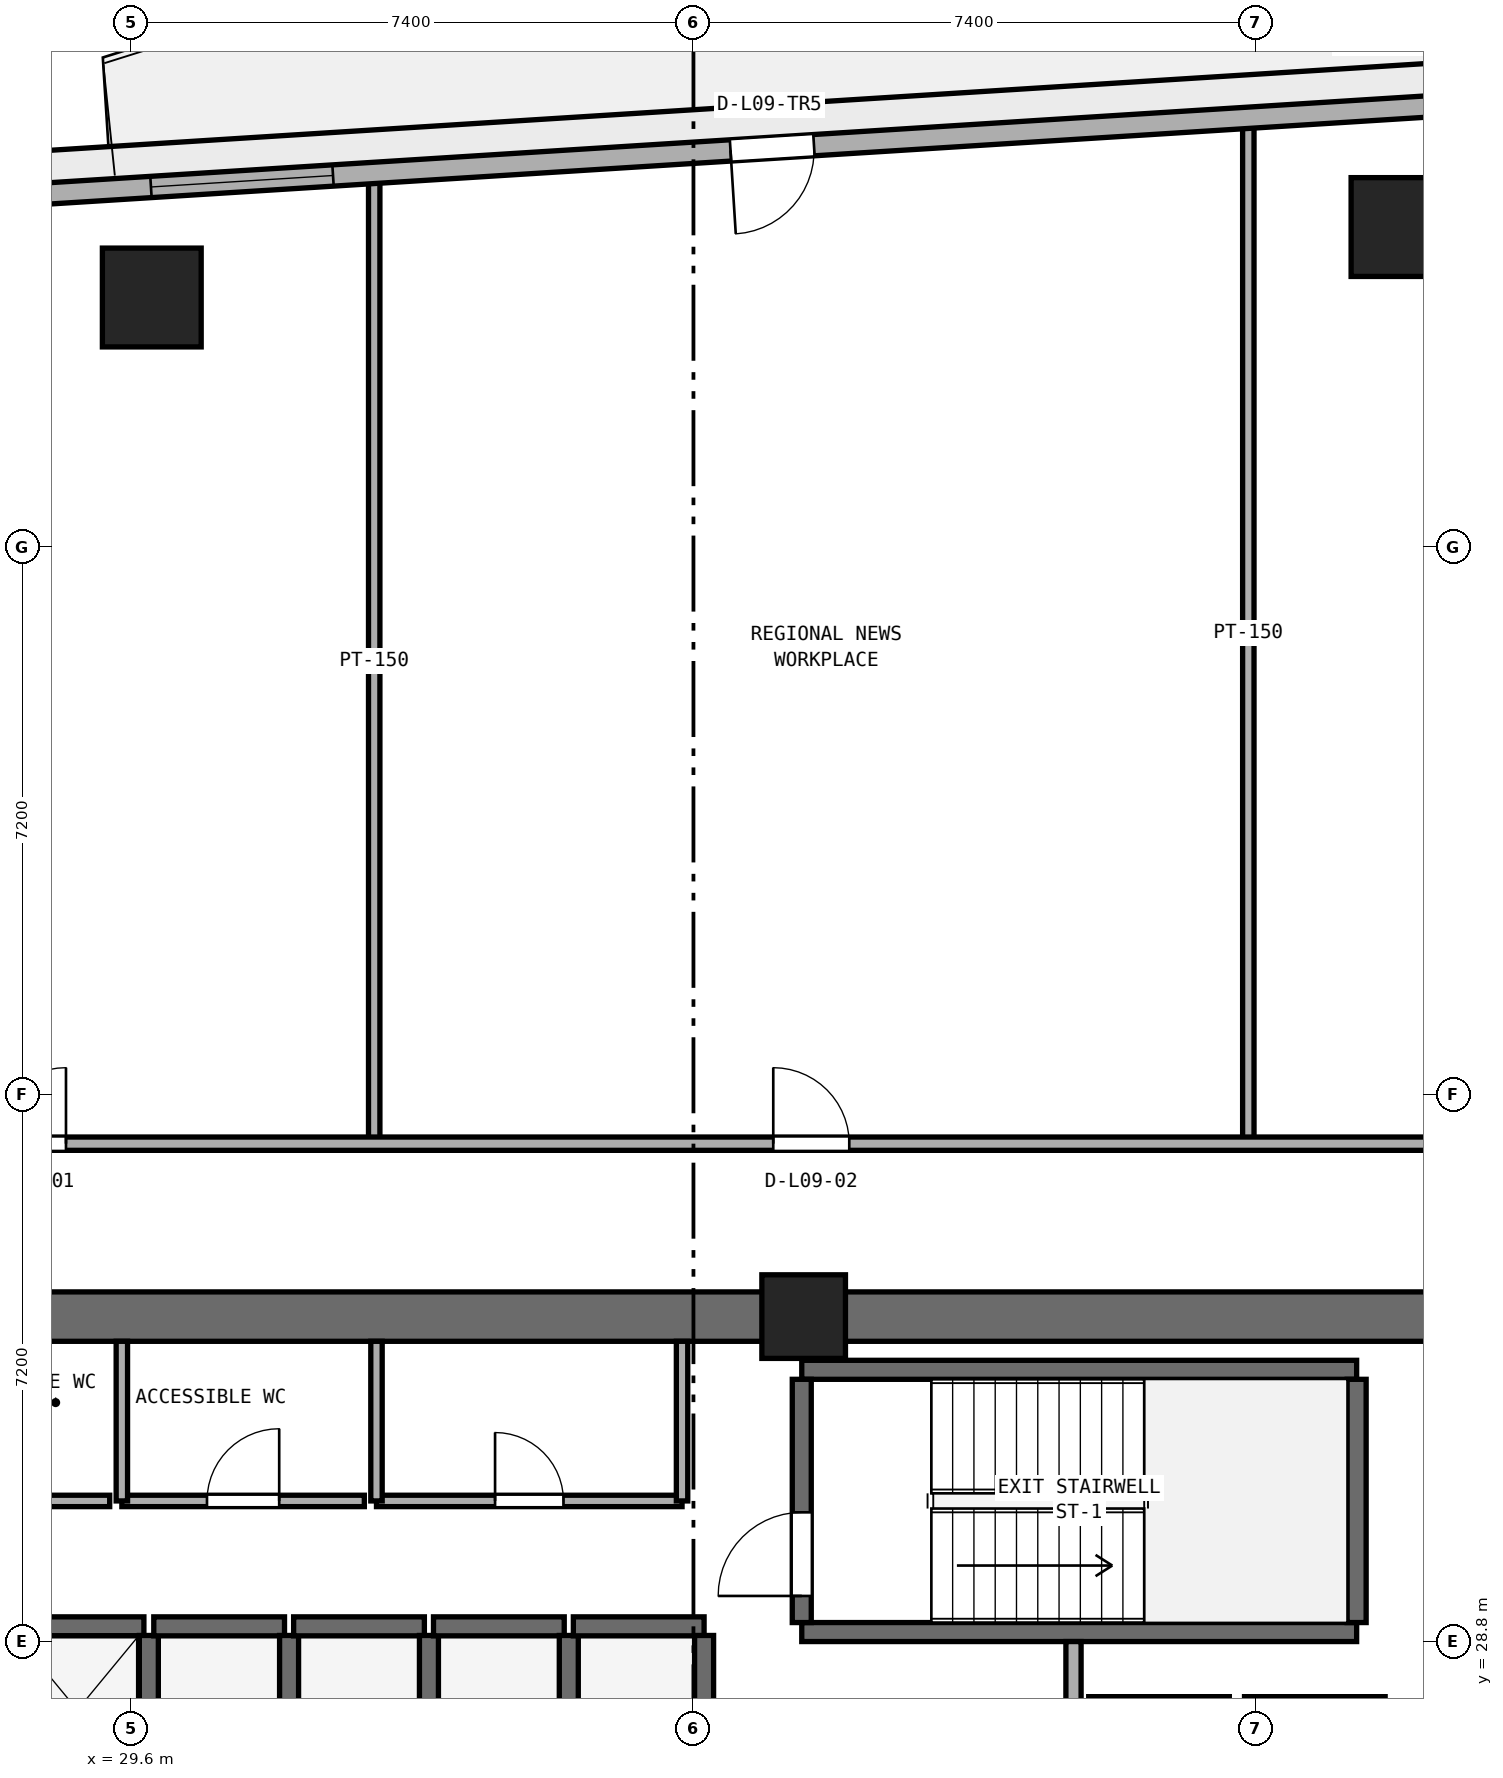
"""IFC4 building model, lengths in metres.
Left out: names, types, materials, properties, quantities, classifications, styles, units other than length and angle.
Written with IfcOpenShell. Run it as: python <this file> out.ifc"""

import sys

from ifc_helpers import new_model, si_unit, direction, frame, frame_2d, origin, origin_2d, place, context, subcontext, project, spatial, rectangle, extrude, element, fill, save


model = new_model("IFC4")
c1 = context("Model", 3, precision=1e-05, world=origin(), true_north=direction((0.0, 1.0)))
c2 = subcontext(c1, "Body", "Model", "MODEL_VIEW")
j1 = project(units=[si_unit("LENGTHUNIT", "METRE"), si_unit("PLANEANGLEUNIT", "RADIAN")], contexts=[c1])
p1 = place(None, origin())
s1 = spatial("IfcSite", under=j1, at=p1, CompositionType="ELEMENT")
p2 = place(p1, origin())
s2 = spatial("IfcBuilding", under=s1, at=p2, CompositionType="ELEMENT")
p3 = place(p2, frame((0.0, 0.0, 40.2)))
s3 = spatial("IfcBuildingStorey", under=s2, at=p3, CompositionType="ELEMENT", Elevation=40.2)
p4 = place(p3, frame((25.4, 33.075, 0.0), z_axis=(0.0, 0.0, 1.0), x_axis=(1.0, 0.0, 0.0)))
e1 = element("IfcWall", 1, at=p4, inside=s3, PredefinedType="SHEAR", context=c2, shape_type="SweptSolid", body=[
    extrude(rectangle(XDim=23.2, YDim=0.65, at=frame_2d((11.6, 0.0))), origin(), (0.0, 0.0, 1.0), 3.525),
])
p5 = place(p3, frame((38.45, 33.075, 0.0), z_axis=(0.0, 0.0, 1.0), x_axis=(1.0, 0.0, 0.0)))
e2 = element("IfcColumn", 2, at=p5, inside=s3, PredefinedType="PILASTER", context=c2, shape_type="SweptSolid", body=[
    extrude(rectangle(XDim=1.1, YDim=1.1, at=origin_2d()), origin(), (0.0, 0.0, 1.0), 3.8),
])
for number, where, z_axis, x_axis in (
    (3, (46.302, 47.409, 0.0), (0.0, 0.0, 1.0), (1.0, 0.0, 0.0)),
    (4, (29.874, 46.482, 0.0), (0.0, 0.0, 1.0), (1.0, 0.0, 0.0)),
):
    element("IfcColumn", number, at=place(p3, frame(where, z_axis=z_axis, x_axis=x_axis)), inside=s3, PredefinedType="COLUMN", context=c2, shape_type="SweptSolid", body=[
        extrude(rectangle(XDim=1.3, YDim=1.3, at=origin_2d()), origin(), (0.0, 0.0, 1.0), 3.8),
    ])
for number, where, z_axis, x_axis in (
    (5, (38.425, 28.925, 0.0), (0.0, 0.0, 1.0), (1.0, 0.0, 0.0)),
    (6, (38.425, 32.375, 0.0), (0.0, 0.0, 1.0), (1.0, 0.0, 0.0)),
):
    element("IfcWall", number, at=place(p3, frame(where, z_axis=z_axis, x_axis=x_axis)), inside=s3, PredefinedType="SHEAR", context=c2, shape_type="SweptSolid", body=[
        extrude(rectangle(XDim=7.3, YDim=0.25, at=frame_2d((3.65, 0.0))), origin(), (0.0, 0.0, 1.0), 3.525),
    ])
p6 = place(p3, frame((38.425, 29.05, 0.0), z_axis=(0.0, 0.0, 1.0), x_axis=(0.0, 1.0, 0.0)))
e7 = element("IfcWall", 7, at=p6, inside=s3, PredefinedType="SHEAR", context=c2, shape_type="SweptSolid", body=[
    extrude(rectangle(XDim=3.2, YDim=0.25, at=frame_2d((1.6, 0.0))), origin(), (0.0, 0.0, 1.0), 3.525),
])
p7 = place(p6, frame((0.35, 0.0, 0.0)))
e8 = element("IfcOpeningElement", 8, at=p7, cuts=e7, PredefinedType="OPENING", context=c2, shape_type="SweptSolid", body=[
    extrude(rectangle(XDim=1.1, YDim=2.15, at=frame_2d((0.55, 1.075))), frame((0.0, 0.135, 0.0), z_axis=(0.0, -1.0, 0.0), x_axis=(1.0, 0.0, 0.0)), (0.0, 0.0, 1.0), 0.27),
])
p8 = place(p3, frame((45.725, 29.05, 0.0), z_axis=(0.0, 0.0, 1.0), x_axis=(0.0, 1.0, 0.0)))
e9 = element("IfcWall", 9, at=p8, inside=s3, PredefinedType="SHEAR", context=c2, shape_type="SweptSolid", body=[
    extrude(rectangle(XDim=3.2, YDim=0.25, at=frame_2d((1.6, 0.0))), origin(), (0.0, 0.0, 1.0), 3.525),
])
p9 = place(p3, frame((28.02, 29.0, 0.0), z_axis=(0.0, 0.0, 1.0), x_axis=(1.0, 0.0, 0.0)))
e10 = element("IfcWall", 10, at=p9, inside=s3, PredefinedType="SHEAR", context=c2, shape_type="SweptSolid", body=[
    extrude(rectangle(XDim=1.75, YDim=0.25, at=frame_2d((0.875, 0.0))), origin(), (0.0, 0.0, 1.0), 3.525),
])
p10 = place(p3, frame((29.835, 26.92, 0.0), z_axis=(0.0, 0.0, 1.0), x_axis=(0.0, 1.0, 0.0)))
e11 = element("IfcWall", 11, at=p10, inside=s3, PredefinedType="SHEAR", context=c2, shape_type="SweptSolid", body=[
    extrude(rectangle(XDim=1.96, YDim=0.25, at=frame_2d((0.98, 0.0))), origin(), (0.0, 0.0, 1.0), 3.525),
])
p11 = place(p3, frame((29.9, 29.0, 0.0), z_axis=(0.0, 0.0, 1.0), x_axis=(1.0, 0.0, 0.0)))
e12 = element("IfcWall", 12, at=p11, inside=s3, PredefinedType="SHEAR", context=c2, shape_type="SweptSolid", body=[
    extrude(rectangle(XDim=1.72, YDim=0.25, at=frame_2d((0.86, 0.0))), origin(), (0.0, 0.0, 1.0), 3.525),
])
p12 = place(p3, frame((31.68, 26.92, 0.0), z_axis=(0.0, 0.0, 1.0), x_axis=(0.0, 1.0, 0.0)))
e13 = element("IfcWall", 13, at=p12, inside=s3, PredefinedType="SHEAR", context=c2, shape_type="SweptSolid", body=[
    extrude(rectangle(XDim=1.96, YDim=0.25, at=frame_2d((0.98, 0.0))), origin(), (0.0, 0.0, 1.0), 3.525),
])
p13 = place(p3, frame((31.74, 29.0, 0.0), z_axis=(0.0, 0.0, 1.0), x_axis=(1.0, 0.0, 0.0)))
e14 = element("IfcWall", 14, at=p13, inside=s3, PredefinedType="SHEAR", context=c2, shape_type="SweptSolid", body=[
    extrude(rectangle(XDim=1.72, YDim=0.25, at=frame_2d((0.86, 0.0))), origin(), (0.0, 0.0, 1.0), 3.525),
])
p14 = place(p3, frame((33.52, 26.92, 0.0), z_axis=(0.0, 0.0, 1.0), x_axis=(0.0, 1.0, 0.0)))
e15 = element("IfcWall", 15, at=p14, inside=s3, PredefinedType="SHEAR", context=c2, shape_type="SweptSolid", body=[
    extrude(rectangle(XDim=1.96, YDim=0.25, at=frame_2d((0.98, 0.0))), origin(), (0.0, 0.0, 1.0), 3.525),
])
p15 = place(p3, frame((33.58, 29.0, 0.0), z_axis=(0.0, 0.0, 1.0), x_axis=(1.0, 0.0, 0.0)))
e16 = element("IfcWall", 16, at=p15, inside=s3, PredefinedType="SHEAR", context=c2, shape_type="SweptSolid", body=[
    extrude(rectangle(XDim=1.72, YDim=0.25, at=frame_2d((0.86, 0.0))), origin(), (0.0, 0.0, 1.0), 3.525),
])
p16 = place(p3, frame((35.36, 26.92, 0.0), z_axis=(0.0, 0.0, 1.0), x_axis=(0.0, 1.0, 0.0)))
e17 = element("IfcWall", 17, at=p16, inside=s3, PredefinedType="SHEAR", context=c2, shape_type="SweptSolid", body=[
    extrude(rectangle(XDim=1.96, YDim=0.25, at=frame_2d((0.98, 0.0))), origin(), (0.0, 0.0, 1.0), 3.525),
])
p17 = place(p3, frame((35.42, 29.0, 0.0), z_axis=(0.0, 0.0, 1.0), x_axis=(1.0, 0.0, 0.0)))
e18 = element("IfcWall", 18, at=p17, inside=s3, PredefinedType="SHEAR", context=c2, shape_type="SweptSolid", body=[
    extrude(rectangle(XDim=1.72, YDim=0.25, at=frame_2d((0.86, 0.0))), origin(), (0.0, 0.0, 1.0), 3.525),
])
p18 = place(p3, frame((37.14, 26.92, 0.0), z_axis=(0.0, 0.0, 1.0), x_axis=(0.0, 1.0, 0.0)))
e19 = element("IfcWall", 19, at=p18, inside=s3, PredefinedType="SHEAR", context=c2, shape_type="SweptSolid", body=[
    extrude(rectangle(XDim=1.96, YDim=0.25, at=frame_2d((0.98, 0.0))), origin(), (0.0, 0.0, 1.0), 3.525),
])
for number, where, z_axis, x_axis in (
    (20, (42.2, 27.95, 0.0), (0.0, 0.0, 1.0), (1.0, 0.0, 0.0)),
    (21, (44.25, 27.95, 0.0), (0.0, 0.0, 1.0), (1.0, 0.0, 0.0)),
):
    element("IfcWall", number, at=place(p3, frame(where, z_axis=z_axis, x_axis=x_axis)), inside=s3, PredefinedType="SHEAR", context=c2, shape_type="SweptSolid", body=[
        extrude(rectangle(XDim=1.85, YDim=0.25, at=frame_2d((0.925, 0.0))), origin(), (0.0, 0.0, 1.0), 3.525),
    ])
p19 = place(p3, frame((42.0, 22.75, 0.0), z_axis=(0.0, 0.0, 1.0), x_axis=(0.0, 1.0, 0.0)))
e22 = element("IfcWall", 22, at=p19, inside=s3, PredefinedType="SOLIDWALL", context=c2, shape_type="SweptSolid", body=[
    extrude(rectangle(XDim=6.05, YDim=0.2, at=frame_2d((3.025, 0.0))), origin(), (0.0, 0.0, 1.0), 3.525),
])
p20 = place(p19, frame((0.65, 0.0, 0.0)))
e23 = element("IfcOpeningElement", 23, at=p20, cuts=e22, PredefinedType="OPENING", context=c2, shape_type="SweptSolid", body=[
    extrude(rectangle(XDim=1.2, YDim=2.15, at=frame_2d((0.6, 1.075))), frame((0.0, 0.11, 0.0), z_axis=(0.0, -1.0, 0.0), x_axis=(1.0, 0.0, 0.0)), (0.0, 0.0, 1.0), 0.22),
])
p21 = place(p3, frame((26.17, 30.65, 0.0), z_axis=(0.0, 0.0, 1.0), x_axis=(1.0, 0.0, 0.0)))
e24 = element("IfcWall", 24, at=p21, inside=s3, PredefinedType="PARTITIONING", context=c2, shape_type="SweptSolid", body=[
    extrude(rectangle(XDim=3.15, YDim=0.15, at=frame_2d((1.575, 0.0))), origin(), (0.0, 0.0, 1.0), 3.525),
])
p22 = place(p21, frame((1.1, 0.0, 0.0)))
e25 = element("IfcOpeningElement", 25, at=p22, cuts=e24, PredefinedType="OPENING", context=c2, shape_type="SweptSolid", body=[
    extrude(rectangle(XDim=0.95, YDim=2.1, at=frame_2d((0.475, 1.05))), frame((0.0, 0.085, 0.0), z_axis=(0.0, -1.0, 0.0), x_axis=(1.0, 0.0, 0.0)), (0.0, 0.0, 1.0), 0.17),
])
p23 = place(p3, frame((29.48, 30.65, 0.0), z_axis=(0.0, 0.0, 1.0), x_axis=(1.0, 0.0, 0.0)))
e26 = element("IfcWall", 26, at=p23, inside=s3, PredefinedType="PARTITIONING", context=c2, shape_type="SweptSolid", body=[
    extrude(rectangle(XDim=3.19, YDim=0.15, at=frame_2d((1.595, 0.0))), origin(), (0.0, 0.0, 1.0), 3.525),
])
p24 = place(p23, frame((1.12, 0.0, 0.0)))
e27 = element("IfcOpeningElement", 27, at=p24, cuts=e26, PredefinedType="OPENING", context=c2, shape_type="SweptSolid", body=[
    extrude(rectangle(XDim=0.95, YDim=2.1, at=frame_2d((0.475, 1.05))), frame((0.0, 0.085, 0.0), z_axis=(0.0, -1.0, 0.0), x_axis=(1.0, 0.0, 0.0)), (0.0, 0.0, 1.0), 0.17),
])
p25 = place(p3, frame((29.48, 30.65, 0.0), z_axis=(0.0, 0.0, 1.0), x_axis=(0.0, 1.0, 0.0)))
e28 = element("IfcWall", 28, at=p25, inside=s3, PredefinedType="PARTITIONING", context=c2, shape_type="SweptSolid", body=[
    extrude(rectangle(XDim=2.1, YDim=0.15, at=frame_2d((1.05, 0.0))), origin(), (0.0, 0.0, 1.0), 3.525),
])
p26 = place(p3, frame((32.83, 30.65, 0.0), z_axis=(0.0, 0.0, 1.0), x_axis=(1.0, 0.0, 0.0)))
e29 = element("IfcWall", 29, at=p26, inside=s3, PredefinedType="PARTITIONING", context=c2, shape_type="SweptSolid", body=[
    extrude(rectangle(XDim=4.02, YDim=0.15, at=frame_2d((2.01, 0.0))), origin(), (0.0, 0.0, 1.0), 3.525),
])
p27 = place(p26, frame((1.56, 0.0, 0.0)))
e30 = element("IfcOpeningElement", 30, at=p27, cuts=e29, PredefinedType="OPENING", context=c2, shape_type="SweptSolid", body=[
    extrude(rectangle(XDim=0.9, YDim=2.1, at=frame_2d((0.45, 1.05))), frame((0.0, 0.085, 0.0), z_axis=(0.0, -1.0, 0.0), x_axis=(1.0, 0.0, 0.0)), (0.0, 0.0, 1.0), 0.17),
])
for number, where, z_axis, x_axis in (
    (31, (32.83, 30.65, 0.0), (0.0, 0.0, 1.0), (0.0, 1.0, 0.0)),
    (32, (36.85, 30.65, 0.0), (0.0, 0.0, 1.0), (0.0, 1.0, 0.0)),
):
    element("IfcWall", number, at=place(p3, frame(where, z_axis=z_axis, x_axis=x_axis)), inside=s3, PredefinedType="PARTITIONING", context=c2, shape_type="SweptSolid", body=[
        extrude(rectangle(XDim=2.1, YDim=0.15, at=frame_2d((1.05, 0.0))), origin(), (0.0, 0.0, 1.0), 3.525),
    ])
p28 = place(p3, frame((44.3, 35.35, 0.0), z_axis=(0.0, 0.0, 1.0), x_axis=(0.0, 1.0, 0.0)))
e33 = element("IfcWall", 33, at=p28, inside=s3, PredefinedType="PARTITIONING", context=c2, shape_type="SweptSolid", body=[
    extrude(rectangle(XDim=13.432, YDim=0.15, at=frame_2d((6.716, 0.0))), origin(), (0.0, 0.0, 1.0), 3.525),
])
p29 = place(p3, frame((32.8, 35.35, 0.0), z_axis=(0.0, 0.0, 1.0), x_axis=(0.0, 1.0, 0.0)))
e34 = element("IfcWall", 34, at=p29, inside=s3, PredefinedType="PARTITIONING", context=c2, shape_type="SweptSolid", body=[
    extrude(rectangle(XDim=12.707, YDim=0.15, at=frame_2d((6.353, 0.0))), origin(), (0.0, 0.0, 1.0), 3.525),
])
p30 = place(p3, frame((23.45, 35.35, 0.0), z_axis=(0.0, 0.0, 1.0), x_axis=(1.0, 0.0, 0.0)))
e35 = element("IfcWall", 35, at=p30, inside=s3, PredefinedType="PARTITIONING", context=c2, shape_type="SweptSolid", body=[
    extrude(rectangle(XDim=27.1, YDim=0.175, at=frame_2d((13.55, 0.0))), origin(), (0.0, 0.0, 1.0), 3.525),
])
p31 = place(p30, frame((4.295, 0.0, 0.0)))
e36 = element("IfcOpeningElement", 36, at=p31, cuts=e35, PredefinedType="OPENING", context=c2, shape_type="SweptSolid", body=[
    extrude(rectangle(XDim=1.0, YDim=2.12, at=frame_2d((0.5, 1.06))), frame((0.0, 0.097, 0.0), z_axis=(0.0, -1.0, 0.0), x_axis=(1.0, 0.0, 0.0)), (0.0, 0.0, 1.0), 0.195),
])
p32 = place(p30, frame((14.6, 0.0, 0.0)))
e37 = element("IfcOpeningElement", 37, at=p32, cuts=e35, PredefinedType="OPENING", context=c2, shape_type="SweptSolid", body=[
    extrude(rectangle(XDim=1.0, YDim=2.12, at=frame_2d((0.5, 1.06))), frame((0.0, 0.097, 0.0), z_axis=(0.0, -1.0, 0.0), x_axis=(1.0, 0.0, 0.0)), (0.0, 0.0, 1.0), 0.195),
])
p33 = place(p30, frame((23.405, 0.0, 0.0)))
e38 = element("IfcOpeningElement", 38, at=p33, cuts=e35, PredefinedType="OPENING", context=c2, shape_type="SweptSolid", body=[
    extrude(rectangle(XDim=0.9, YDim=2.1, at=frame_2d((0.45, 1.05))), frame((0.0, 0.097, 0.0), z_axis=(0.0, -1.0, 0.0), x_axis=(1.0, 0.0, 0.0)), (0.0, 0.0, 1.0), 0.195),
])
p34 = place(p3, frame((47.832, 49.069, 0.0), z_axis=(0.0, 0.0, 1.0), x_axis=(-0.998017725054, -0.062933460723, 0.0)))
e39 = element("IfcWall", 39, at=p34, inside=s3, PredefinedType="STANDARD", context=c2, shape_type="SweptSolid", body=[
    extrude(rectangle(XDim=19.629, YDim=0.28, at=frame_2d((9.815, 0.0))), origin(), (0.0, 0.0, 1.0), 3.525),
])
p35 = place(p34, frame((9.265, 0.0, 0.0)))
e40 = element("IfcOpeningElement", 40, at=p35, cuts=e39, PredefinedType="OPENING", context=c2, shape_type="SweptSolid", body=[
    extrude(rectangle(XDim=1.1, YDim=2.2, at=frame_2d((0.55, 1.1))), frame((0.0, 0.15, 0.0), z_axis=(0.0, -1.0, 0.0), x_axis=(1.0, 0.0, 0.0)), (0.0, 0.0, 1.0), 0.3),
])
p36 = place(p34, frame((15.604, 0.0, 0.9)))
e41 = element("IfcOpeningElement", 41, at=p36, cuts=e39, PredefinedType="OPENING", context=c2, shape_type="SweptSolid", body=[
    extrude(rectangle(XDim=2.4, YDim=1.75, at=frame_2d((1.2, 0.875))), frame((0.0, 0.15, 0.0), z_axis=(0.0, -1.0, 0.0), x_axis=(1.0, 0.0, 0.0)), (0.0, 0.0, 1.0), 0.3),
])
p37 = place(p7, origin())
e42 = element("IfcDoor", 42, at=p37, inside=s3, OperationType="SINGLE_SWING_LEFT", PredefinedType="DOOR", context=c2, shape_type="SweptSolid", body=[
    extrude(rectangle(XDim=1.1, YDim=2.15, at=frame_2d((0.55, 1.075))), frame((0.0, 0.025, 0.0), z_axis=(0.0, -1.0, 0.0), x_axis=(1.0, 0.0, 0.0)), (0.0, 0.0, 1.0), 0.05),
])
fill(e8, e42)
p38 = place(p24, origin())
e43 = element("IfcDoor", 43, at=p38, inside=s3, OperationType="SINGLE_SWING_RIGHT", PredefinedType="DOOR", context=c2, shape_type="SweptSolid", body=[
    extrude(rectangle(XDim=0.95, YDim=2.1, at=frame_2d((0.475, 1.05))), frame((0.0, 0.025, 0.0), z_axis=(0.0, -1.0, 0.0), x_axis=(1.0, 0.0, 0.0)), (0.0, 0.0, 1.0), 0.05),
])
fill(e27, e43)
p39 = place(p27, origin())
e44 = element("IfcDoor", 44, at=p39, inside=s3, OperationType="SINGLE_SWING_LEFT", PredefinedType="DOOR", context=c2, shape_type="SweptSolid", body=[
    extrude(rectangle(XDim=0.9, YDim=2.1, at=frame_2d((0.45, 1.05))), frame((0.0, 0.025, 0.0), z_axis=(0.0, -1.0, 0.0), x_axis=(1.0, 0.0, 0.0)), (0.0, 0.0, 1.0), 0.05),
])
fill(e30, e44)
p40 = place(p31, origin())
e45 = element("IfcDoor", 45, at=p40, inside=s3, OperationType="SINGLE_SWING_RIGHT", PredefinedType="DOOR", context=c2, shape_type="SweptSolid", body=[
    extrude(rectangle(XDim=1.0, YDim=2.12, at=frame_2d((0.5, 1.06))), frame((0.0, 0.025, 0.0), z_axis=(0.0, -1.0, 0.0), x_axis=(1.0, 0.0, 0.0)), (0.0, 0.0, 1.0), 0.05),
])
fill(e36, e45)
p41 = place(p32, origin())
e46 = element("IfcDoor", 46, at=p41, inside=s3, OperationType="SINGLE_SWING_LEFT", PredefinedType="DOOR", context=c2, shape_type="SweptSolid", body=[
    extrude(rectangle(XDim=1.0, YDim=2.12, at=frame_2d((0.5, 1.06))), frame((0.0, 0.025, 0.0), z_axis=(0.0, -1.0, 0.0), x_axis=(1.0, 0.0, 0.0)), (0.0, 0.0, 1.0), 0.05),
])
fill(e37, e46)
p42 = place(p35, origin())
e47 = element("IfcDoor", 47, at=p42, inside=s3, OperationType="SINGLE_SWING_RIGHT", PredefinedType="DOOR", context=c2, shape_type="SweptSolid", body=[
    extrude(rectangle(XDim=1.1, YDim=2.2, at=frame_2d((0.55, 1.1))), frame((0.0, 0.025, 0.0), z_axis=(0.0, -1.0, 0.0), x_axis=(1.0, 0.0, 0.0)), (0.0, 0.0, 1.0), 0.05),
])
fill(e40, e47)
p43 = place(p36, origin())
e48 = element("IfcWindow", 48, at=p43, inside=s3, PartitioningType="SINGLE_PANEL", PredefinedType="WINDOW", context=c2, shape_type="SweptSolid", body=[
    extrude(rectangle(XDim=2.4, YDim=1.75, at=frame_2d((1.2, 0.875))), frame((0.0, 0.03, 0.0), z_axis=(0.0, -1.0, 0.0), x_axis=(1.0, 0.0, 0.0)), (0.0, 0.0, 1.0), 0.06),
])
fill(e41, e48)
save(model, sys.argv[1])
